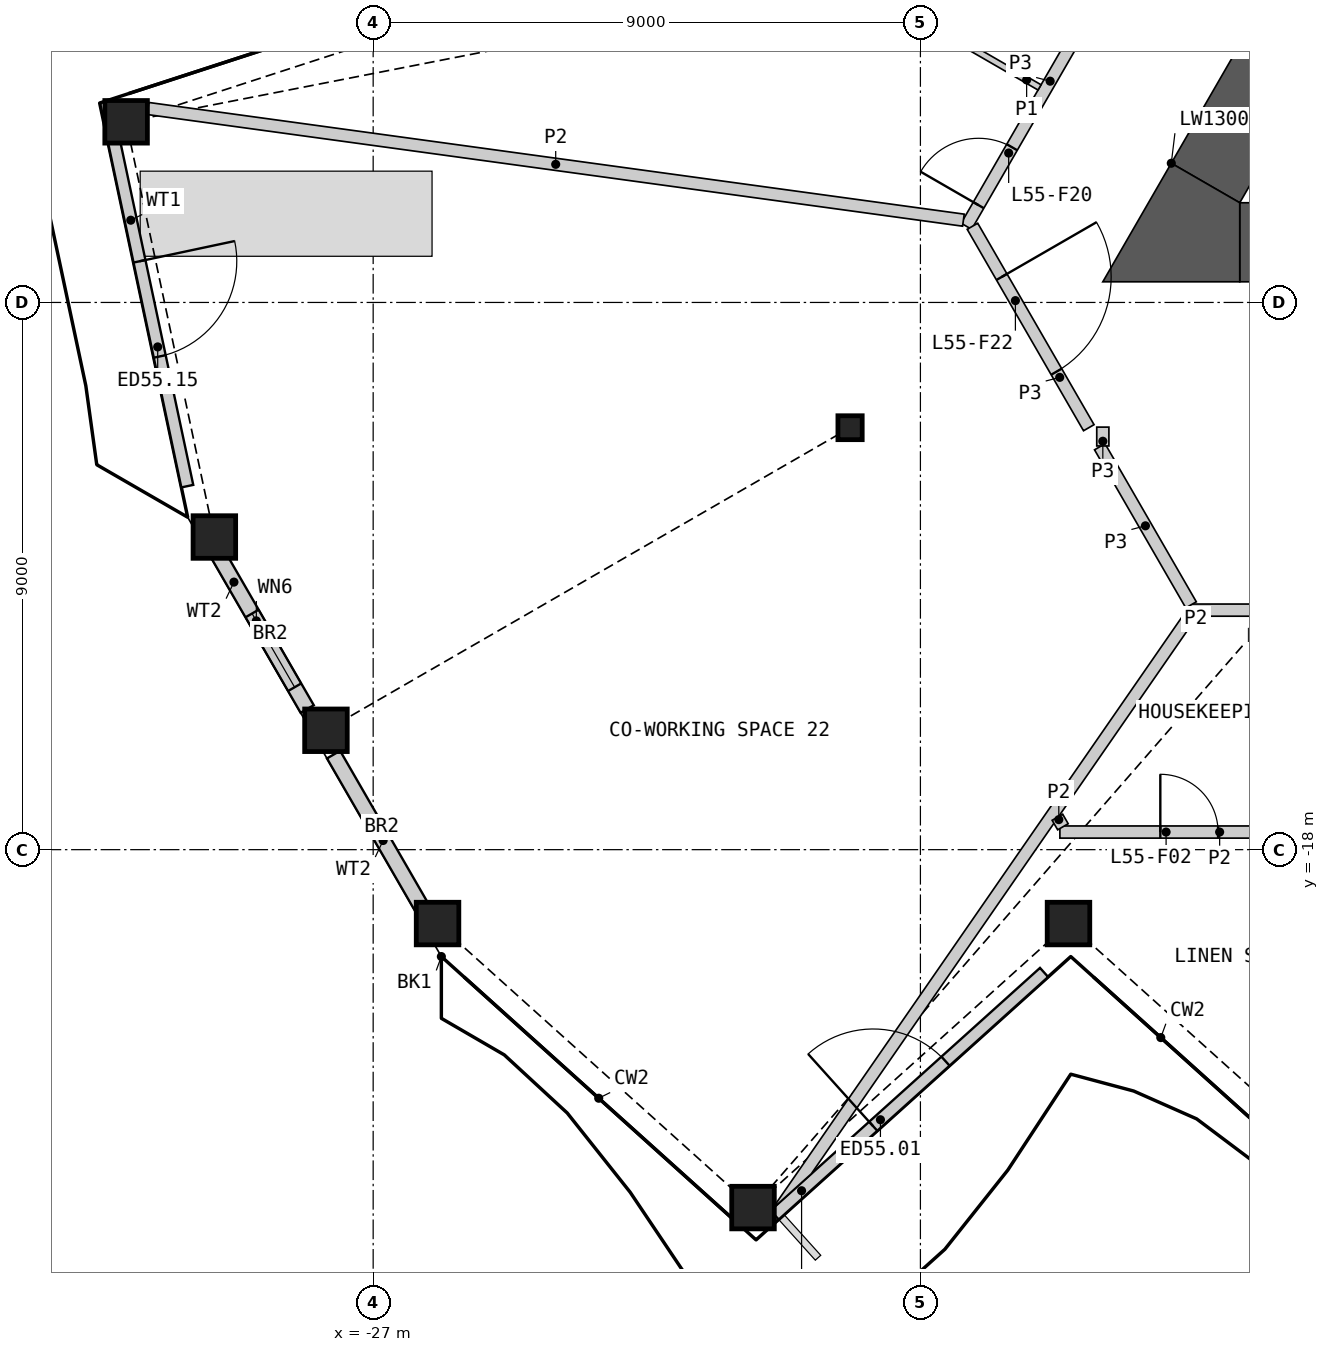
"""IFC4 building model, lengths in metres.
Left out: names, types, materials, properties, quantities, classifications, styles, units other than length and angle.
Written with IfcOpenShell. Run it as: python <this file> out.ifc"""

import sys

from ifc_helpers import new_model, si_unit, direction, frame, frame_2d, origin, origin_2d, place, context, subcontext, project, spatial, polyline, rectangle, hollow_rectangle, i_section, outline, extrude, element, fill, save


model = new_model("IFC4")
c1 = context("Model", 3, precision=1e-05, world=origin(), true_north=direction((0.0, 1.0)))
c2 = subcontext(c1, "Body", "Model", "MODEL_VIEW")
j1 = project(units=[si_unit("LENGTHUNIT", "METRE"), si_unit("PLANEANGLEUNIT", "RADIAN")], contexts=[c1])
p1 = place(None, origin())
s1 = spatial("IfcSite", under=j1, at=p1, CompositionType="ELEMENT")
p2 = place(p1, origin())
s2 = spatial("IfcBuilding", under=s1, at=p2, CompositionType="ELEMENT")
p3 = place(p2, frame((0.0, 0.0, 249.0)))
s3 = spatial("IfcBuildingStorey", under=s2, at=p3, CompositionType="ELEMENT", Elevation=249.0)
for number, where, z_axis, x_axis in (
    (1, (-25.941, -19.215, 0.0), (0.0, 0.0, 1.0), (1.0, 0.0, 0.0)),
    (2, (-20.753, -23.887, 0.0), (0.0, 0.0, 1.0), (1.0, 0.0, 0.0)),
    (3, (-15.565, -19.215, 0.0), (0.0, 0.0, 1.0), (1.0, 0.0, 0.0)),
    (4, (-31.063, -6.029, 0.0), (0.0, 0.0, 1.0), (1.0, 0.0, 0.0)),
    (5, (-29.612, -12.858, 0.0), (0.0, 0.0, 1.0), (1.0, 0.0, 0.0)),
    (6, (-27.776, -16.037, 0.0), (0.0, 0.0, 1.0), (1.0, 0.0, 0.0)),
):
    element("IfcColumn", number, at=place(p3, frame(where, z_axis=z_axis, x_axis=x_axis)), inside=s3, PredefinedType="COLUMN", context=c2, shape_type="SweptSolid", body=[
        extrude(hollow_rectangle(XDim=0.7, YDim=0.7, WallThickness=0.045, at=origin_2d()), origin(), (0.0, 0.0, 1.0), 3.6),
    ])
p4 = place(p3, frame((-19.157, -11.06, 0.0), z_axis=(0.0, 0.0, 1.0), x_axis=(1.0, 0.0, 0.0)))
e7 = element("IfcColumn", 7, at=p4, inside=s3, PredefinedType="COLUMN", context=c2, shape_type="SweptSolid", body=[
    extrude(i_section(OverallWidth=0.399, OverallDepth=0.393, WebThickness=0.023, FlangeThickness=0.037, at=origin_2d()), origin(), (0.0, 0.0, 1.0), 3.6),
])
p5 = place(p3, frame((-20.397, -24.009, 0.0), z_axis=(0.0, 0.0, 1.0), x_axis=(0.74315161366, 0.669123067241, 0.0)))
e8 = element("IfcWall", 8, at=p5, inside=s3, PredefinedType="SOLIDWALL", context=c2, shape_type="SweptSolid", body=[
    extrude(rectangle(XDim=5.963, YDim=0.2, at=frame_2d((2.981, 0.0))), origin(), (0.0, 0.0, 1.0), 2.701),
])
p6 = place(p5, frame((2.181, 0.0, 0.0)))
e9 = element("IfcOpeningElement", 9, at=p6, cuts=e8, PredefinedType="OPENING", context=c2, shape_type="SweptSolid", body=[
    extrude(rectangle(XDim=1.6, YDim=2.4, at=frame_2d((0.8, 1.2))), frame((0.0, 0.11, 0.0), z_axis=(0.0, -1.0, 0.0), x_axis=(1.0, 0.0, 0.0)), (0.0, 0.0, 1.0), 0.22),
])
p7 = place(p3, frame((-31.296, -6.189, 0.0), z_axis=(0.0, 0.0, 1.0), x_axis=(0.207920947907, -0.978145633033, 0.0)))
e10 = element("IfcWall", 10, at=p7, inside=s3, PredefinedType="SOLIDWALL", context=c2, shape_type="SweptSolid", body=[
    extrude(rectangle(XDim=5.963, YDim=0.2, at=frame_2d((2.981, 0.0))), origin(), (0.0, 0.0, 1.0), 2.701),
])
p8 = place(p7, frame((2.181, 0.0, 0.0)))
e11 = element("IfcOpeningElement", 11, at=p8, cuts=e10, PredefinedType="OPENING", context=c2, shape_type="SweptSolid", body=[
    extrude(rectangle(XDim=1.6, YDim=2.4, at=frame_2d((0.8, 1.2))), frame((0.0, 0.11, 0.0), z_axis=(0.0, -1.0, 0.0), x_axis=(1.0, 0.0, 0.0)), (0.0, 0.0, 1.0), 0.22),
])
p9 = place(p3, frame((-29.692, -12.904, 0.0), z_axis=(0.0, 0.0, 1.0), x_axis=(0.499987708133, -0.866032500381, 0.0)))
e12 = element("IfcWall", 12, at=p9, inside=s3, PredefinedType="SOLIDWALL", context=c2, shape_type="SweptSolid", body=[
    extrude(rectangle(XDim=3.213, YDim=0.25, at=frame_2d((1.607, 0.0))), origin(), (0.0, 0.0, 1.0), 2.701),
])
p10 = place(p9, frame((1.4, 0.0, 1.9)))
e13 = element("IfcOpeningElement", 13, at=p10, cuts=e12, PredefinedType="OPENING", context=c2, shape_type="SweptSolid", body=[
    extrude(rectangle(XDim=1.4, YDim=0.6, at=frame_2d((0.7, 0.3))), frame((0.0, 0.135, 0.0), z_axis=(0.0, -1.0, 0.0), x_axis=(1.0, 0.0, 0.0)), (0.0, 0.0, 1.0), 0.27),
])
p11 = place(p3, frame((-27.652, -16.437, 0.0), z_axis=(0.0, 0.0, 1.0), x_axis=(0.500026945261, -0.866009846372, 0.0)))
e14 = element("IfcWall", 14, at=p11, inside=s3, PredefinedType="SOLIDWALL", context=c2, shape_type="SweptSolid", body=[
    extrude(rectangle(XDim=3.262, YDim=0.25, at=frame_2d((1.631, 0.0))), origin(), (0.0, 0.0, 1.0), 2.701),
])
p12 = place(p3, frame((-12.748, -8.01, 0.0), z_axis=(0.0, 0.0, 1.0), x_axis=(1.0, 0.0, 0.0)))
e15 = element("IfcWall", 15, at=p12, inside=s3, PredefinedType="SHEAR", context=c2, shape_type="SweptSolid", body=[
    extrude(rectangle(XDim=4.26, YDim=1.3, at=frame_2d((2.13, 0.0))), origin(), (0.0, 0.0, 1.0), 3.25),
])
p13 = place(p3, frame((-10.338, -1.885, 0.0), z_axis=(0.0, 0.0, 1.0), x_axis=(-0.499975944838, -0.866039291593, 0.0)))
e16 = element("IfcWall", 16, at=p13, inside=s3, PredefinedType="SHEAR", context=c2, shape_type="SweptSolid", body=[
    extrude(rectangle(XDim=5.947, YDim=1.3, at=frame_2d((2.974, 0.0))), origin(), (0.0, 0.0, 1.0), 3.25),
])
p14 = place(p3, origin())
e17 = element("IfcWall", 17, at=p14, inside=s3, PredefinedType="SHEAR", context=c2, shape_type="SweptSolid", body=[
    extrude(outline(polyline([(-13.874, -6.71), (-12.748, -7.36), (-12.748, -8.66), (-15.0, -8.66), (-13.874, -6.71)])), origin(), (0.0, 0.0, 1.0), 3.25),
])
p15 = place(p3, frame((-13.599, -14.06, 0.0), z_axis=(0.0, 0.0, 1.0), x_axis=(1.0, 0.0, 0.0)))
e18 = element("IfcWall", 18, at=p15, inside=s3, PredefinedType="PARTITIONING", context=c2, shape_type="SweptSolid", body=[
    extrude(rectangle(XDim=27.198, YDim=0.2, at=frame_2d((13.599, 0.0))), origin(), (0.0, 0.0, 1.0), 3.25),
])
p16 = place(p15, frame((1.152, 0.0, 0.0)))
e19 = element("IfcOpeningElement", 19, at=p16, cuts=e18, PredefinedType="OPENING", context=c2, shape_type="SweptSolid", body=[
    extrude(rectangle(XDim=0.95, YDim=2.1, at=frame_2d((0.475, 1.05))), frame((0.0, 0.11, 0.0), z_axis=(0.0, -1.0, 0.0), x_axis=(1.0, 0.0, 0.0)), (0.0, 0.0, 1.0), 0.22),
])
p17 = place(p15, frame((16.311, 0.0, 0.0)))
e20 = element("IfcOpeningElement", 20, at=p17, cuts=e18, PredefinedType="OPENING", context=c2, shape_type="SweptSolid", body=[
    extrude(rectangle(XDim=1.1, YDim=2.1, at=frame_2d((0.55, 1.05))), frame((0.0, 0.11, 0.0), z_axis=(0.0, -1.0, 0.0), x_axis=(1.0, 0.0, 0.0)), (0.0, 0.0, 1.0), 0.22),
])
p18 = place(p15, frame((25.747, 0.0, 0.0)))
e21 = element("IfcOpeningElement", 21, at=p18, cuts=e18, PredefinedType="OPENING", context=c2, shape_type="SweptSolid", body=[
    extrude(rectangle(XDim=1.1, YDim=2.1, at=frame_2d((0.55, 1.05))), frame((0.0, 0.11, 0.0), z_axis=(0.0, -1.0, 0.0), x_axis=(1.0, 0.0, 0.0)), (0.0, 0.0, 1.0), 0.22),
])
p19 = place(p3, frame((-17.244, -7.747, 0.0), z_axis=(0.0, 0.0, 1.0), x_axis=(0.500017753321, 0.866015153657, 0.0)))
e22 = element("IfcWall", 22, at=p19, inside=s3, PredefinedType="PARTITIONING", context=c2, shape_type="SweptSolid", body=[
    extrude(rectangle(XDim=5.51, YDim=0.2, at=frame_2d((2.755, 0.0))), origin(), (0.0, 0.0, 1.0), 3.25),
])
p20 = place(p19, frame((0.401, 0.0, 0.0)))
e23 = element("IfcOpeningElement", 23, at=p20, cuts=e22, PredefinedType="OPENING", context=c2, shape_type="SweptSolid", body=[
    extrude(rectangle(XDim=1.1, YDim=2.1, at=frame_2d((0.55, 1.05))), frame((0.0, 0.11, 0.0), z_axis=(0.0, -1.0, 0.0), x_axis=(1.0, 0.0, 0.0)), (0.0, 0.0, 1.0), 0.22),
])
p21 = place(p3, frame((-17.144, -7.747, 0.0), z_axis=(0.0, 0.0, 1.0), x_axis=(0.499961815444, -0.866047448526, 0.0)))
e24 = element("IfcWall", 24, at=p21, inside=s3, PredefinedType="PARTITIONING", context=c2, shape_type="SweptSolid", body=[
    extrude(rectangle(XDim=3.826, YDim=0.2, at=frame_2d((1.913, 0.0))), origin(), (0.0, 0.0, 1.0), 3.25),
])
p22 = place(p21, frame((0.962, 0.0, 0.0)))
e25 = element("IfcOpeningElement", 25, at=p22, cuts=e24, PredefinedType="OPENING", context=c2, shape_type="SweptSolid", body=[
    extrude(rectangle(XDim=1.8, YDim=2.1, at=frame_2d((0.9, 1.05))), frame((0.0, 0.11, 0.0), z_axis=(0.0, -1.0, 0.0), x_axis=(1.0, 0.0, 0.0)), (0.0, 0.0, 1.0), 0.22),
])
p23 = place(p3, frame((-15.05, -11.374, 0.0), z_axis=(0.0, 0.0, 1.0), x_axis=(0.500048608389, -0.865997337899, 0.0)))
e26 = element("IfcWall", 26, at=p23, inside=s3, PredefinedType="PARTITIONING", context=c2, shape_type="SweptSolid", body=[
    extrude(rectangle(XDim=3.002, YDim=0.2, at=frame_2d((1.501, 0.0))), origin(), (0.0, 0.0, 1.0), 3.25),
])
p24 = place(p3, frame((-15.0, -11.36, 0.0), z_axis=(0.0, 0.0, 1.0), x_axis=(0.0, 1.0, 0.0)))
e27 = element("IfcWall", 27, at=p24, inside=s3, PredefinedType="PARTITIONING", context=c2, shape_type="SweptSolid", body=[
    extrude(rectangle(XDim=0.31, YDim=0.2, at=frame_2d((0.155, 0.0))), origin(), (0.0, 0.0, 1.0), 3.25),
])
p25 = place(p3, frame((-30.703, -5.81, 0.0), z_axis=(0.0, 0.0, 1.0), x_axis=(0.99075075074, -0.135694325259, 0.0)))
e28 = element("IfcWall", 28, at=p25, inside=s3, PredefinedType="PARTITIONING", context=c2, shape_type="SweptSolid", body=[
    extrude(rectangle(XDim=13.535, YDim=0.2, at=frame_2d((6.768, 0.0))), origin(), (0.0, 0.0, 1.0), 2.404),
])
p26 = place(p3, origin())
e29 = element("IfcWall", 29, at=p26, inside=s3, PredefinedType="PARTITIONING", context=c2, shape_type="SweptSolid", body=[
    extrude(outline(polyline([(-13.473, -14.199), (-19.794, -23.331), (-20.439, -23.912), (-13.638, -14.086), (-13.473, -14.199)])), origin(), (0.0, 0.0, 1.0), 2.404),
])
p27 = place(p3, frame((-15.706, -17.71, 0.0), z_axis=(0.0, 0.0, 1.0), x_axis=(1.0, 0.0, 0.0)))
e30 = element("IfcWall", 30, at=p27, inside=s3, PredefinedType="PARTITIONING", context=c2, shape_type="SweptSolid", body=[
    extrude(rectangle(XDim=5.255, YDim=0.2, at=frame_2d((2.627, 0.0))), origin(), (0.0, 0.0, 1.0), 2.404),
])
p28 = place(p27, frame((1.652, 0.0, 0.0)))
e31 = element("IfcOpeningElement", 31, at=p28, cuts=e30, PredefinedType="OPENING", context=c2, shape_type="SweptSolid", body=[
    extrude(rectangle(XDim=0.95, YDim=2.1, at=frame_2d((0.475, 1.05))), frame((0.0, 0.11, 0.0), z_axis=(0.0, -1.0, 0.0), x_axis=(1.0, 0.0, 0.0)), (0.0, 0.0, 1.0), 0.22),
])
p29 = place(p3, frame((-15.747, -17.467, 0.0), z_axis=(0.0, 0.0, 1.0), x_axis=(0.498749683645, -0.866746071848, 0.0)))
e32 = element("IfcWall", 32, at=p29, inside=s3, PredefinedType="PARTITIONING", context=c2, shape_type="SweptSolid", body=[
    extrude(rectangle(XDim=0.181, YDim=0.2, at=frame_2d((0.091, 0.0))), origin(), (0.0, 0.0, 1.0), 2.404),
])
p30 = place(p3, frame((-18.163, -4.238, 0.0), z_axis=(0.0, 0.0, 1.0), x_axis=(0.866014668023, -0.500018594424, 0.0)))
e33 = element("IfcWall", 33, at=p30, inside=s3, PredefinedType="PARTITIONING", context=c2, shape_type="SweptSolid", body=[
    extrude(rectangle(XDim=2.45, YDim=0.1, at=frame_2d((1.225, 0.0))), origin(), (0.0, 0.0, 1.0), 2.404),
])
p31 = place(p6, origin())
e34 = element("IfcDoor", 34, at=p31, inside=s3, OperationType="DOUBLE_DOOR_SINGLE_SWING", PredefinedType="DOOR", context=c2, shape_type="SweptSolid", body=[
    extrude(rectangle(XDim=1.6, YDim=2.4, at=frame_2d((0.8, 1.2))), frame((0.0, 0.025, 0.0), z_axis=(0.0, -1.0, 0.0), x_axis=(1.0, 0.0, 0.0)), (0.0, 0.0, 1.0), 0.05),
])
fill(e9, e34)
p32 = place(p8, origin())
e35 = element("IfcDoor", 35, at=p32, inside=s3, OperationType="DOUBLE_DOOR_SINGLE_SWING", PredefinedType="DOOR", context=c2, shape_type="SweptSolid", body=[
    extrude(rectangle(XDim=1.6, YDim=2.4, at=frame_2d((0.8, 1.2))), frame((0.0, 0.025, 0.0), z_axis=(0.0, -1.0, 0.0), x_axis=(1.0, 0.0, 0.0)), (0.0, 0.0, 1.0), 0.05),
])
fill(e11, e35)
p33 = place(p10, origin())
e36 = element("IfcWindow", 36, at=p33, inside=s3, PartitioningType="SINGLE_PANEL", PredefinedType="WINDOW", context=c2, shape_type="SweptSolid", body=[
    extrude(rectangle(XDim=1.4, YDim=0.6, at=frame_2d((0.7, 0.3))), frame((0.0, 0.03, 0.0), z_axis=(0.0, -1.0, 0.0), x_axis=(1.0, 0.0, 0.0)), (0.0, 0.0, 1.0), 0.06),
])
fill(e13, e36)
p34 = place(p28, origin())
e37 = element("IfcDoor", 37, at=p34, inside=s3, OperationType="SINGLE_SWING_LEFT", PredefinedType="DOOR", context=c2, shape_type="SweptSolid", body=[
    extrude(rectangle(XDim=0.95, YDim=2.1, at=frame_2d((0.475, 1.05))), frame((0.0, 0.025, 0.0), z_axis=(0.0, -1.0, 0.0), x_axis=(1.0, 0.0, 0.0)), (0.0, 0.0, 1.0), 0.05),
])
fill(e31, e37)
p35 = place(p20, origin())
e38 = element("IfcDoor", 38, at=p35, inside=s3, OperationType="SINGLE_SWING_LEFT", PredefinedType="DOOR", context=c2, shape_type="SweptSolid", body=[
    extrude(rectangle(XDim=1.1, YDim=2.1, at=frame_2d((0.55, 1.05))), frame((0.0, 0.025, 0.0), z_axis=(0.0, -1.0, 0.0), x_axis=(1.0, 0.0, 0.0)), (0.0, 0.0, 1.0), 0.05),
])
fill(e23, e38)
p36 = place(p22, origin())
e39 = element("IfcDoor", 39, at=p36, inside=s3, OperationType="DOUBLE_DOOR_SINGLE_SWING", PredefinedType="DOOR", context=c2, shape_type="SweptSolid", body=[
    extrude(rectangle(XDim=1.8, YDim=2.1, at=frame_2d((0.9, 1.05))), frame((0.0, 0.025, 0.0), z_axis=(0.0, -1.0, 0.0), x_axis=(1.0, 0.0, 0.0)), (0.0, 0.0, 1.0), 0.05),
])
fill(e25, e39)
save(model, sys.argv[1])
